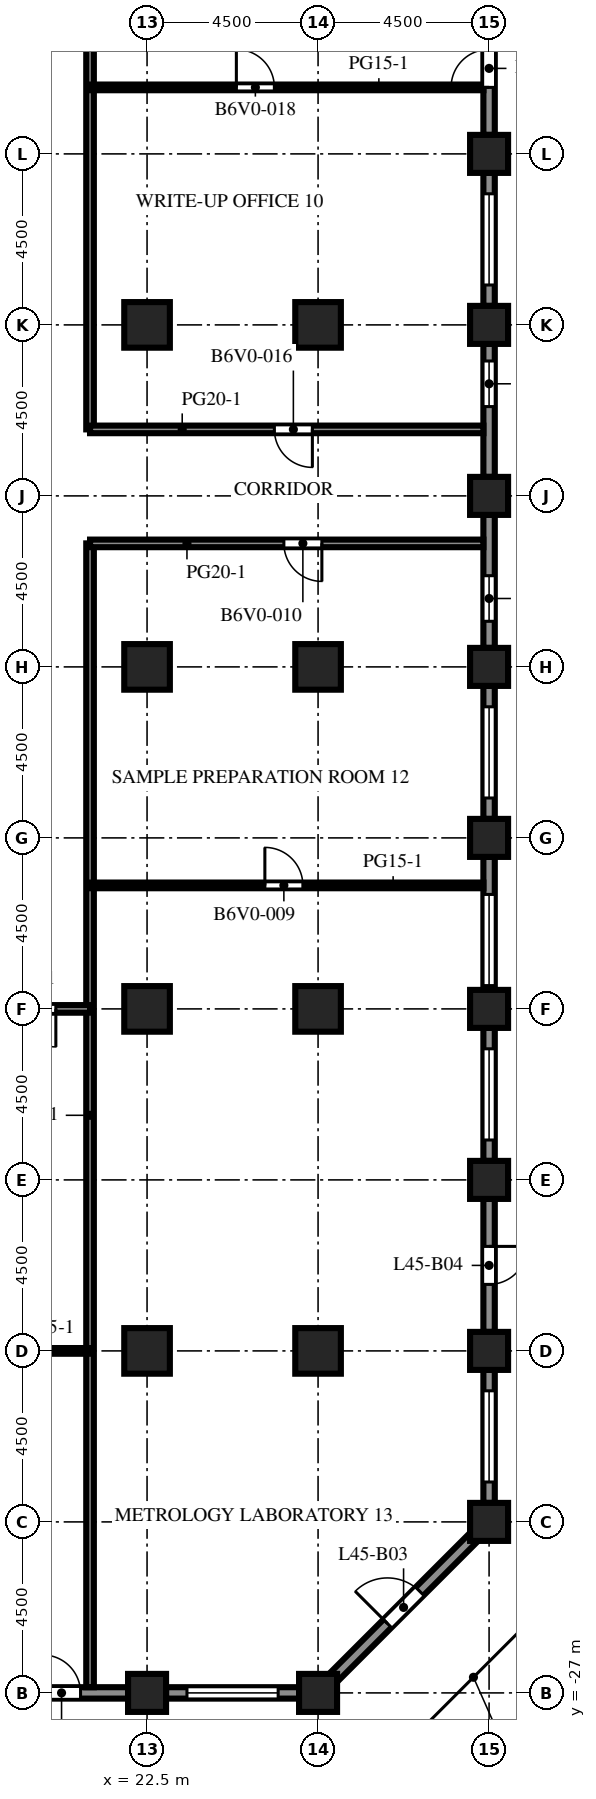
"""IFC4 building model, lengths in metres.
Left out: names, types, materials, properties, quantities, classifications, styles, units other than length and angle.
Written with IfcOpenShell. Run it as: python <this file> out.ifc"""

import sys

from ifc_helpers import new_model, si_unit, direction, frame, frame_2d, origin, origin_2d, place, context, subcontext, project, spatial, rectangle, extrude, element, fill, save


model = new_model("IFC4")
c1 = context("Model", 3, precision=1e-05, world=origin(), true_north=direction((0.0, 1.0)))
c2 = subcontext(c1, "Body", "Model", "MODEL_VIEW")
j1 = project(units=[si_unit("LENGTHUNIT", "METRE"), si_unit("PLANEANGLEUNIT", "RADIAN")], contexts=[c1])
p1 = place(None, origin())
s1 = spatial("IfcSite", under=j1, at=p1, CompositionType="ELEMENT")
p2 = place(p1, origin())
s2 = spatial("IfcBuilding", under=s1, at=p2, CompositionType="ELEMENT")
p3 = place(p2, frame((0.0, 0.0, 199.7)))
s3 = spatial("IfcBuildingStorey", under=s2, at=p3, CompositionType="ELEMENT", Elevation=199.7)
for number, where, z_axis, x_axis in (
    (1, (22.5, -27.0, 0.0), (0.0, 0.0, 1.0), (1.0, 0.0, 0.0)),
    (2, (27.0, -27.0, 0.0), (0.0, 0.0, 1.0), (1.0, 0.0, 0.0)),
    (3, (31.5, -22.5, 0.0), (0.0, 0.0, 1.0), (1.0, 0.0, 0.0)),
    (4, (31.5, -18.0, 0.0), (0.0, 0.0, 1.0), (1.0, 0.0, 0.0)),
    (5, (31.5, -13.5, 0.0), (0.0, 0.0, 1.0), (1.0, 0.0, 0.0)),
    (6, (31.5, -9.0, 0.0), (0.0, 0.0, 1.0), (1.0, 0.0, 0.0)),
    (7, (31.5, -4.5, 0.0), (0.0, 0.0, 1.0), (1.0, 0.0, 0.0)),
    (8, (31.5, 0.0, 0.0), (0.0, 0.0, 1.0), (1.0, 0.0, 0.0)),
    (9, (31.5, 4.5, 0.0), (0.0, 0.0, 1.0), (1.0, 0.0, 0.0)),
    (10, (31.5, 9.0, 0.0), (0.0, 0.0, 1.0), (1.0, 0.0, 0.0)),
    (11, (31.5, 13.5, 0.0), (0.0, 0.0, 1.0), (1.0, 0.0, 0.0)),
):
    element("IfcColumn", number, at=place(p3, frame(where, z_axis=z_axis, x_axis=x_axis)), inside=s3, PredefinedType="COLUMN", context=c2, shape_type="SweptSolid", body=[
        extrude(rectangle(XDim=1.0, YDim=1.0, at=origin_2d()), origin(), (0.0, 0.0, 1.0), 4.1),
    ])
for number, where, z_axis, x_axis in (
    (12, (22.5, -18.0, 0.0), (0.0, 0.0, 1.0), (1.0, 0.0, 0.0)),
    (13, (22.5, -9.0, 0.0), (0.0, 0.0, 1.0), (1.0, 0.0, 0.0)),
    (14, (22.5, 0.0, 0.0), (0.0, 0.0, 1.0), (1.0, 0.0, 0.0)),
    (15, (22.5, 9.0, 0.0), (0.0, 0.0, 1.0), (1.0, 0.0, 0.0)),
    (16, (27.0, -18.0, 0.0), (0.0, 0.0, 1.0), (1.0, 0.0, 0.0)),
    (17, (27.0, -9.0, 0.0), (0.0, 0.0, 1.0), (1.0, 0.0, 0.0)),
    (18, (27.0, 0.0, 0.0), (0.0, 0.0, 1.0), (1.0, 0.0, 0.0)),
    (19, (27.0, 9.0, 0.0), (0.0, 0.0, 1.0), (1.0, 0.0, 0.0)),
):
    element("IfcColumn", number, at=place(p3, frame(where, z_axis=z_axis, x_axis=x_axis)), inside=s3, PredefinedType="COLUMN", context=c2, shape_type="SweptSolid", body=[
        extrude(rectangle(XDim=1.2, YDim=1.2, at=origin_2d()), origin(), (0.0, 0.0, 1.0), 4.1),
    ])
p4 = place(p3, frame((22.0, -27.0, 0.0), z_axis=(0.0, 0.0, 1.0), x_axis=(-1.0, 0.0, 0.0)))
e20 = element("IfcWall", 20, at=p4, inside=s3, PredefinedType="SOLIDWALL", context=c2, shape_type="SweptSolid", body=[
    extrude(rectangle(XDim=3.5, YDim=0.3, at=frame_2d((1.75, 0.0))), origin(), (0.0, 0.0, 1.0), 2.85),
])
p5 = place(p4, frame((1.25, 0.0, 0.0)))
e21 = element("IfcOpeningElement", 21, at=p5, cuts=e20, PredefinedType="OPENING", context=c2, shape_type="SweptSolid", body=[
    extrude(rectangle(XDim=1.0, YDim=2.2, at=frame_2d((0.5, 1.1))), frame((0.0, 0.16, 0.0), z_axis=(0.0, -1.0, 0.0), x_axis=(1.0, 0.0, 0.0)), (0.0, 0.0, 1.0), 0.32),
])
p6 = place(p3, frame((26.5, -27.0, 0.0), z_axis=(0.0, 0.0, 1.0), x_axis=(-1.0, 0.0, 0.0)))
e22 = element("IfcWall", 22, at=p6, inside=s3, PredefinedType="SOLIDWALL", context=c2, shape_type="SweptSolid", body=[
    extrude(rectangle(XDim=3.5, YDim=0.3, at=frame_2d((1.75, 0.0))), origin(), (0.0, 0.0, 1.0), 2.85),
])
p7 = place(p6, frame((0.55, 0.0, 0.8)))
e23 = element("IfcOpeningElement", 23, at=p7, cuts=e22, PredefinedType="OPENING", context=c2, shape_type="SweptSolid", body=[
    extrude(rectangle(XDim=2.4, YDim=1.7, at=frame_2d((1.2, 0.85))), frame((0.0, 0.16, 0.0), z_axis=(0.0, -1.0, 0.0), x_axis=(1.0, 0.0, 0.0)), (0.0, 0.0, 1.0), 0.32),
])
p8 = place(p3, frame((31.106, -22.894, 0.0), z_axis=(0.0, 0.0, 1.0), x_axis=(-0.707106781187, -0.707106781187, 0.0)))
e24 = element("IfcWall", 24, at=p8, inside=s3, PredefinedType="SOLIDWALL", context=c2, shape_type="SweptSolid", body=[
    extrude(rectangle(XDim=5.25, YDim=0.3, at=frame_2d((2.625, 0.0))), origin(), (0.0, 0.0, 1.0), 2.85),
])
p9 = place(p8, frame((2.025, 0.0, 0.0)))
e25 = element("IfcOpeningElement", 25, at=p9, cuts=e24, PredefinedType="OPENING", context=c2, shape_type="SweptSolid", body=[
    extrude(rectangle(XDim=1.2, YDim=2.2, at=frame_2d((0.6, 1.1))), frame((0.0, 0.16, 0.0), z_axis=(0.0, -1.0, 0.0), x_axis=(1.0, 0.0, 0.0)), (0.0, 0.0, 1.0), 0.32),
])
p10 = place(p3, frame((31.5, -18.5, 0.0), z_axis=(0.0, 0.0, 1.0), x_axis=(0.0, -1.0, 0.0)))
e26 = element("IfcWall", 26, at=p10, inside=s3, PredefinedType="SOLIDWALL", context=c2, shape_type="SweptSolid", body=[
    extrude(rectangle(XDim=3.5, YDim=0.3, at=frame_2d((1.75, 0.0))), origin(), (0.0, 0.0, 1.0), 2.85),
])
p11 = place(p10, frame((0.55, 0.0, 0.8)))
e27 = element("IfcOpeningElement", 27, at=p11, cuts=e26, PredefinedType="OPENING", context=c2, shape_type="SweptSolid", body=[
    extrude(rectangle(XDim=2.4, YDim=1.7, at=frame_2d((1.2, 0.85))), frame((0.0, 0.16, 0.0), z_axis=(0.0, -1.0, 0.0), x_axis=(1.0, 0.0, 0.0)), (0.0, 0.0, 1.0), 0.32),
])
p12 = place(p3, frame((31.5, -14.0, 0.0), z_axis=(0.0, 0.0, 1.0), x_axis=(0.0, -1.0, 0.0)))
e28 = element("IfcWall", 28, at=p12, inside=s3, PredefinedType="SOLIDWALL", context=c2, shape_type="SweptSolid", body=[
    extrude(rectangle(XDim=3.5, YDim=0.3, at=frame_2d((1.75, 0.0))), origin(), (0.0, 0.0, 1.0), 2.85),
])
p13 = place(p12, frame((1.25, 0.0, 0.0)))
e29 = element("IfcOpeningElement", 29, at=p13, cuts=e28, PredefinedType="OPENING", context=c2, shape_type="SweptSolid", body=[
    extrude(rectangle(XDim=1.0, YDim=2.2, at=frame_2d((0.5, 1.1))), frame((0.0, 0.16, 0.0), z_axis=(0.0, -1.0, 0.0), x_axis=(1.0, 0.0, 0.0)), (0.0, 0.0, 1.0), 0.32),
])
p14 = place(p3, frame((31.5, -9.5, 0.0), z_axis=(0.0, 0.0, 1.0), x_axis=(0.0, -1.0, 0.0)))
e30 = element("IfcWall", 30, at=p14, inside=s3, PredefinedType="SOLIDWALL", context=c2, shape_type="SweptSolid", body=[
    extrude(rectangle(XDim=3.5, YDim=0.3, at=frame_2d((1.75, 0.0))), origin(), (0.0, 0.0, 1.0), 2.85),
])
p15 = place(p14, frame((0.55, 0.0, 0.8)))
e31 = element("IfcOpeningElement", 31, at=p15, cuts=e30, PredefinedType="OPENING", context=c2, shape_type="SweptSolid", body=[
    extrude(rectangle(XDim=2.4, YDim=1.7, at=frame_2d((1.2, 0.85))), frame((0.0, 0.16, 0.0), z_axis=(0.0, -1.0, 0.0), x_axis=(1.0, 0.0, 0.0)), (0.0, 0.0, 1.0), 0.32),
])
p16 = place(p3, frame((31.5, -5.0, 0.0), z_axis=(0.0, 0.0, 1.0), x_axis=(0.0, -1.0, 0.0)))
e32 = element("IfcWall", 32, at=p16, inside=s3, PredefinedType="SOLIDWALL", context=c2, shape_type="SweptSolid", body=[
    extrude(rectangle(XDim=3.5, YDim=0.3, at=frame_2d((1.75, 0.0))), origin(), (0.0, 0.0, 1.0), 2.85),
])
p17 = place(p16, frame((0.988, 0.0, 0.8)))
e33 = element("IfcOpeningElement", 33, at=p17, cuts=e32, PredefinedType="OPENING", context=c2, shape_type="SweptSolid", body=[
    extrude(rectangle(XDim=2.4, YDim=1.7, at=frame_2d((1.2, 0.85))), frame((0.0, 0.16, 0.0), z_axis=(0.0, -1.0, 0.0), x_axis=(1.0, 0.0, 0.0)), (0.0, 0.0, 1.0), 0.32),
])
p18 = place(p3, frame((31.5, -0.5, 0.0), z_axis=(0.0, 0.0, 1.0), x_axis=(0.0, -1.0, 0.0)))
e34 = element("IfcWall", 34, at=p18, inside=s3, PredefinedType="SOLIDWALL", context=c2, shape_type="SweptSolid", body=[
    extrude(rectangle(XDim=3.5, YDim=0.3, at=frame_2d((1.75, 0.0))), origin(), (0.0, 0.0, 1.0), 2.85),
])
p19 = place(p18, frame((0.55, 0.0, 0.8)))
e35 = element("IfcOpeningElement", 35, at=p19, cuts=e34, PredefinedType="OPENING", context=c2, shape_type="SweptSolid", body=[
    extrude(rectangle(XDim=2.4, YDim=1.7, at=frame_2d((1.2, 0.85))), frame((0.0, 0.16, 0.0), z_axis=(0.0, -1.0, 0.0), x_axis=(1.0, 0.0, 0.0)), (0.0, 0.0, 1.0), 0.32),
])
p20 = place(p3, frame((31.5, 4.0, 0.0), z_axis=(0.0, 0.0, 1.0), x_axis=(0.0, -1.0, 0.0)))
e36 = element("IfcWall", 36, at=p20, inside=s3, PredefinedType="SOLIDWALL", context=c2, shape_type="SweptSolid", body=[
    extrude(rectangle(XDim=3.5, YDim=0.3, at=frame_2d((1.75, 0.0))), origin(), (0.0, 0.0, 1.0), 2.85),
])
p21 = place(p20, frame((1.6, 0.0, 0.8)))
e37 = element("IfcOpeningElement", 37, at=p21, cuts=e36, PredefinedType="OPENING", context=c2, shape_type="SweptSolid", body=[
    extrude(rectangle(XDim=1.2, YDim=1.7, at=frame_2d((0.6, 0.85))), frame((0.0, 0.16, 0.0), z_axis=(0.0, -1.0, 0.0), x_axis=(1.0, 0.0, 0.0)), (0.0, 0.0, 1.0), 0.32),
])
p22 = place(p3, frame((31.5, 8.5, 0.0), z_axis=(0.0, 0.0, 1.0), x_axis=(0.0, -1.0, 0.0)))
e38 = element("IfcWall", 38, at=p22, inside=s3, PredefinedType="SOLIDWALL", context=c2, shape_type="SweptSolid", body=[
    extrude(rectangle(XDim=3.5, YDim=0.3, at=frame_2d((1.75, 0.0))), origin(), (0.0, 0.0, 1.0), 2.85),
])
p23 = place(p22, frame((0.45, 0.0, 0.8)))
e39 = element("IfcOpeningElement", 39, at=p23, cuts=e38, PredefinedType="OPENING", context=c2, shape_type="SweptSolid", body=[
    extrude(rectangle(XDim=1.2, YDim=1.7, at=frame_2d((0.6, 0.85))), frame((0.0, 0.16, 0.0), z_axis=(0.0, -1.0, 0.0), x_axis=(1.0, 0.0, 0.0)), (0.0, 0.0, 1.0), 0.32),
])
p24 = place(p3, frame((31.5, 13.0, 0.0), z_axis=(0.0, 0.0, 1.0), x_axis=(0.0, -1.0, 0.0)))
e40 = element("IfcWall", 40, at=p24, inside=s3, PredefinedType="SOLIDWALL", context=c2, shape_type="SweptSolid", body=[
    extrude(rectangle(XDim=3.5, YDim=0.3, at=frame_2d((1.75, 0.0))), origin(), (0.0, 0.0, 1.0), 2.85),
])
p25 = place(p24, frame((0.55, 0.0, 0.8)))
e41 = element("IfcOpeningElement", 41, at=p25, cuts=e40, PredefinedType="OPENING", context=c2, shape_type="SweptSolid", body=[
    extrude(rectangle(XDim=2.4, YDim=1.7, at=frame_2d((1.2, 0.85))), frame((0.0, 0.16, 0.0), z_axis=(0.0, -1.0, 0.0), x_axis=(1.0, 0.0, 0.0)), (0.0, 0.0, 1.0), 0.32),
])
p26 = place(p3, frame((31.5, 17.5, 0.0), z_axis=(0.0, 0.0, 1.0), x_axis=(0.0, -1.0, 0.0)))
e42 = element("IfcWall", 42, at=p26, inside=s3, PredefinedType="SOLIDWALL", context=c2, shape_type="SweptSolid", body=[
    extrude(rectangle(XDim=3.5, YDim=0.3, at=frame_2d((1.75, 0.0))), origin(), (0.0, 0.0, 1.0), 2.85),
])
p27 = place(p26, frame((1.25, 0.0, 0.0)))
e43 = element("IfcOpeningElement", 43, at=p27, cuts=e42, PredefinedType="OPENING", context=c2, shape_type="SweptSolid", body=[
    extrude(rectangle(XDim=1.0, YDim=2.2, at=frame_2d((0.5, 1.1))), frame((0.0, 0.16, 0.0), z_axis=(0.0, -1.0, 0.0), x_axis=(1.0, 0.0, 0.0)), (0.0, 0.0, 1.0), 0.32),
])
p28 = place(p3, frame((21.0, -26.85, 0.0), z_axis=(0.0, 0.0, 1.0), x_axis=(0.0, 1.0, 0.0)))
e44 = element("IfcWall", 44, at=p28, inside=s3, PredefinedType="PARTITIONING", context=c2, shape_type="SweptSolid", body=[
    extrude(rectangle(XDim=30.1, YDim=0.2, at=frame_2d((15.05, 0.0))), origin(), (0.0, 0.0, 1.0), 3.65),
])
p29 = place(p3, frame((21.0, 6.25, 0.0), z_axis=(0.0, 0.0, 1.0), x_axis=(0.0, 1.0, 0.0)))
e45 = element("IfcWall", 45, at=p29, inside=s3, PredefinedType="PARTITIONING", context=c2, shape_type="SweptSolid", body=[
    extrude(rectangle(XDim=20.6, YDim=0.2, at=frame_2d((10.3, 0.0))), origin(), (0.0, 0.0, 1.0), 3.65),
])
p30 = place(p3, frame((18.6, -18.0, 0.0), z_axis=(0.0, 0.0, 1.0), x_axis=(1.0, 0.0, 0.0)))
e46 = element("IfcWall", 46, at=p30, inside=s3, PredefinedType="PARTITIONING", context=c2, shape_type="SweptSolid", body=[
    extrude(rectangle(XDim=2.4, YDim=0.15, at=frame_2d((1.2, 0.0))), origin(), (0.0, 0.0, 1.0), 3.65),
])
p31 = place(p3, frame((21.0, -9.0, 0.0), z_axis=(0.0, 0.0, 1.0), x_axis=(-1.0, 0.0, 0.0)))
e47 = element("IfcWall", 47, at=p31, inside=s3, PredefinedType="PARTITIONING", context=c2, shape_type="SweptSolid", body=[
    extrude(rectangle(XDim=3.0, YDim=0.2, at=frame_2d((1.5, 0.0))), origin(), (0.0, 0.0, 1.0), 3.65),
])
p32 = place(p31, frame((0.9, 0.0, 0.0)))
e48 = element("IfcOpeningElement", 48, at=p32, cuts=e47, PredefinedType="OPENING", context=c2, shape_type="SweptSolid", body=[
    extrude(rectangle(XDim=1.0, YDim=2.1, at=frame_2d((0.5, 1.05))), frame((0.0, 0.11, 0.0), z_axis=(0.0, -1.0, 0.0), x_axis=(1.0, 0.0, 0.0)), (0.0, 0.0, 1.0), 0.22),
])
p33 = place(p3, frame((31.35, -5.75, 0.0), z_axis=(0.0, 0.0, 1.0), x_axis=(-1.0, 0.0, 0.0)))
e49 = element("IfcWall", 49, at=p33, inside=s3, PredefinedType="PARTITIONING", context=c2, shape_type="SweptSolid", body=[
    extrude(rectangle(XDim=10.35, YDim=0.15, at=frame_2d((5.175, 0.0))), origin(), (0.0, 0.0, 1.0), 3.65),
])
p34 = place(p33, frame((4.75, 0.0, 0.0)))
e50 = element("IfcOpeningElement", 50, at=p34, cuts=e49, PredefinedType="OPENING", context=c2, shape_type="SweptSolid", body=[
    extrude(rectangle(XDim=1.0, YDim=2.1, at=frame_2d((0.5, 1.05))), frame((0.0, 0.085, 0.0), z_axis=(0.0, -1.0, 0.0), x_axis=(1.0, 0.0, 0.0)), (0.0, 0.0, 1.0), 0.17),
])
p35 = place(p3, frame((31.35, 3.25, 0.0), z_axis=(0.0, 0.0, 1.0), x_axis=(-1.0, 0.0, 0.0)))
e51 = element("IfcWall", 51, at=p35, inside=s3, PredefinedType="PARTITIONING", context=c2, shape_type="SweptSolid", body=[
    extrude(rectangle(XDim=10.35, YDim=0.2, at=frame_2d((5.175, 0.0))), origin(), (0.0, 0.0, 1.0), 3.65),
])
p36 = place(p35, frame((4.25, 0.0, 0.0)))
e52 = element("IfcOpeningElement", 52, at=p36, cuts=e51, PredefinedType="OPENING", context=c2, shape_type="SweptSolid", body=[
    extrude(rectangle(XDim=1.0, YDim=2.1, at=frame_2d((0.5, 1.05))), frame((0.0, 0.11, 0.0), z_axis=(0.0, -1.0, 0.0), x_axis=(1.0, 0.0, 0.0)), (0.0, 0.0, 1.0), 0.22),
])
p37 = place(p3, frame((21.0, 6.25, 0.0), z_axis=(0.0, 0.0, 1.0), x_axis=(1.0, 0.0, 0.0)))
e53 = element("IfcWall", 53, at=p37, inside=s3, PredefinedType="PARTITIONING", context=c2, shape_type="SweptSolid", body=[
    extrude(rectangle(XDim=10.35, YDim=0.2, at=frame_2d((5.175, 0.0))), origin(), (0.0, 0.0, 1.0), 3.65),
])
p38 = place(p37, frame((4.85, 0.0, 0.0)))
e54 = element("IfcOpeningElement", 54, at=p38, cuts=e53, PredefinedType="OPENING", context=c2, shape_type="SweptSolid", body=[
    extrude(rectangle(XDim=1.0, YDim=2.1, at=frame_2d((0.5, 1.05))), frame((0.0, 0.11, 0.0), z_axis=(0.0, -1.0, 0.0), x_axis=(1.0, 0.0, 0.0)), (0.0, 0.0, 1.0), 0.22),
])
p39 = place(p3, frame((21.0, 15.25, 0.0), z_axis=(0.0, 0.0, 1.0), x_axis=(1.0, 0.0, 0.0)))
e55 = element("IfcWall", 55, at=p39, inside=s3, PredefinedType="PARTITIONING", context=c2, shape_type="SweptSolid", body=[
    extrude(rectangle(XDim=10.35, YDim=0.15, at=frame_2d((5.175, 0.0))), origin(), (0.0, 0.0, 1.0), 3.65),
])
p40 = place(p39, frame((3.85, 0.0, 0.0)))
e56 = element("IfcOpeningElement", 56, at=p40, cuts=e55, PredefinedType="OPENING", context=c2, shape_type="SweptSolid", body=[
    extrude(rectangle(XDim=1.0, YDim=2.1, at=frame_2d((0.5, 1.05))), frame((0.0, 0.085, 0.0), z_axis=(0.0, -1.0, 0.0), x_axis=(1.0, 0.0, 0.0)), (0.0, 0.0, 1.0), 0.17),
])
p41 = place(p5, origin())
e57 = element("IfcDoor", 57, at=p41, inside=s3, OperationType="SINGLE_SWING_RIGHT", PredefinedType="DOOR", context=c2, shape_type="SweptSolid", body=[
    extrude(rectangle(XDim=1.0, YDim=2.2, at=frame_2d((0.5, 1.1))), frame((0.0, 0.025, 0.0), z_axis=(0.0, -1.0, 0.0), x_axis=(1.0, 0.0, 0.0)), (0.0, 0.0, 1.0), 0.05),
])
fill(e21, e57)
p42 = place(p7, origin())
e58 = element("IfcWindow", 58, at=p42, inside=s3, PartitioningType="SINGLE_PANEL", PredefinedType="WINDOW", context=c2, shape_type="SweptSolid", body=[
    extrude(rectangle(XDim=2.4, YDim=1.7, at=frame_2d((1.2, 0.85))), frame((0.0, 0.03, 0.0), z_axis=(0.0, -1.0, 0.0), x_axis=(1.0, 0.0, 0.0)), (0.0, 0.0, 1.0), 0.06),
])
fill(e23, e58)
p43 = place(p9, origin())
e59 = element("IfcDoor", 59, at=p43, inside=s3, OperationType="SINGLE_SWING_RIGHT", PredefinedType="DOOR", context=c2, shape_type="SweptSolid", body=[
    extrude(rectangle(XDim=1.2, YDim=2.2, at=frame_2d((0.6, 1.1))), frame((0.0, 0.025, 0.0), z_axis=(0.0, -1.0, 0.0), x_axis=(1.0, 0.0, 0.0)), (0.0, 0.0, 1.0), 0.05),
])
fill(e25, e59)
p44 = place(p11, origin())
e60 = element("IfcWindow", 60, at=p44, inside=s3, PartitioningType="SINGLE_PANEL", PredefinedType="WINDOW", context=c2, shape_type="SweptSolid", body=[
    extrude(rectangle(XDim=2.4, YDim=1.7, at=frame_2d((1.2, 0.85))), frame((0.0, 0.03, 0.0), z_axis=(0.0, -1.0, 0.0), x_axis=(1.0, 0.0, 0.0)), (0.0, 0.0, 1.0), 0.06),
])
fill(e27, e60)
p45 = place(p13, origin())
e61 = element("IfcDoor", 61, at=p45, inside=s3, OperationType="SINGLE_SWING_LEFT", PredefinedType="DOOR", context=c2, shape_type="SweptSolid", body=[
    extrude(rectangle(XDim=1.0, YDim=2.2, at=frame_2d((0.5, 1.1))), frame((0.0, 0.025, 0.0), z_axis=(0.0, -1.0, 0.0), x_axis=(1.0, 0.0, 0.0)), (0.0, 0.0, 1.0), 0.05),
])
fill(e29, e61)
p46 = place(p15, origin())
e62 = element("IfcWindow", 62, at=p46, inside=s3, PartitioningType="SINGLE_PANEL", PredefinedType="WINDOW", context=c2, shape_type="SweptSolid", body=[
    extrude(rectangle(XDim=2.4, YDim=1.7, at=frame_2d((1.2, 0.85))), frame((0.0, 0.03, 0.0), z_axis=(0.0, -1.0, 0.0), x_axis=(1.0, 0.0, 0.0)), (0.0, 0.0, 1.0), 0.06),
])
fill(e31, e62)
p47 = place(p17, origin())
e63 = element("IfcWindow", 63, at=p47, inside=s3, PartitioningType="SINGLE_PANEL", PredefinedType="WINDOW", context=c2, shape_type="SweptSolid", body=[
    extrude(rectangle(XDim=2.4, YDim=1.7, at=frame_2d((1.2, 0.85))), frame((0.0, 0.03, 0.0), z_axis=(0.0, -1.0, 0.0), x_axis=(1.0, 0.0, 0.0)), (0.0, 0.0, 1.0), 0.06),
])
fill(e33, e63)
p48 = place(p19, origin())
e64 = element("IfcWindow", 64, at=p48, inside=s3, PartitioningType="SINGLE_PANEL", PredefinedType="WINDOW", context=c2, shape_type="SweptSolid", body=[
    extrude(rectangle(XDim=2.4, YDim=1.7, at=frame_2d((1.2, 0.85))), frame((0.0, 0.03, 0.0), z_axis=(0.0, -1.0, 0.0), x_axis=(1.0, 0.0, 0.0)), (0.0, 0.0, 1.0), 0.06),
])
fill(e35, e64)
p49 = place(p21, origin())
e65 = element("IfcWindow", 65, at=p49, inside=s3, PartitioningType="SINGLE_PANEL", PredefinedType="WINDOW", context=c2, shape_type="SweptSolid", body=[
    extrude(rectangle(XDim=1.2, YDim=1.7, at=frame_2d((0.6, 0.85))), frame((0.0, 0.03, 0.0), z_axis=(0.0, -1.0, 0.0), x_axis=(1.0, 0.0, 0.0)), (0.0, 0.0, 1.0), 0.06),
])
fill(e37, e65)
p50 = place(p23, origin())
e66 = element("IfcWindow", 66, at=p50, inside=s3, PartitioningType="SINGLE_PANEL", PredefinedType="WINDOW", context=c2, shape_type="SweptSolid", body=[
    extrude(rectangle(XDim=1.2, YDim=1.7, at=frame_2d((0.6, 0.85))), frame((0.0, 0.03, 0.0), z_axis=(0.0, -1.0, 0.0), x_axis=(1.0, 0.0, 0.0)), (0.0, 0.0, 1.0), 0.06),
])
fill(e39, e66)
p51 = place(p25, origin())
e67 = element("IfcWindow", 67, at=p51, inside=s3, PartitioningType="SINGLE_PANEL", PredefinedType="WINDOW", context=c2, shape_type="SweptSolid", body=[
    extrude(rectangle(XDim=2.4, YDim=1.7, at=frame_2d((1.2, 0.85))), frame((0.0, 0.03, 0.0), z_axis=(0.0, -1.0, 0.0), x_axis=(1.0, 0.0, 0.0)), (0.0, 0.0, 1.0), 0.06),
])
fill(e41, e67)
p52 = place(p27, origin())
e68 = element("IfcDoor", 68, at=p52, inside=s3, OperationType="SINGLE_SWING_RIGHT", PredefinedType="DOOR", context=c2, shape_type="SweptSolid", body=[
    extrude(rectangle(XDim=1.0, YDim=2.2, at=frame_2d((0.5, 1.1))), frame((0.0, 0.025, 0.0), z_axis=(0.0, -1.0, 0.0), x_axis=(1.0, 0.0, 0.0)), (0.0, 0.0, 1.0), 0.05),
])
fill(e43, e68)
p53 = place(p32, origin())
e69 = element("IfcDoor", 69, at=p53, inside=s3, OperationType="SINGLE_SWING_LEFT", PredefinedType="DOOR", context=c2, shape_type="SweptSolid", body=[
    extrude(rectangle(XDim=1.0, YDim=2.1, at=frame_2d((0.5, 1.05))), frame((0.0, 0.025, 0.0), z_axis=(0.0, -1.0, 0.0), x_axis=(1.0, 0.0, 0.0)), (0.0, 0.0, 1.0), 0.05),
])
fill(e48, e69)
p54 = place(p34, origin())
e70 = element("IfcDoor", 70, at=p54, inside=s3, OperationType="SINGLE_SWING_RIGHT", PredefinedType="DOOR", context=c2, shape_type="SweptSolid", body=[
    extrude(rectangle(XDim=1.0, YDim=2.1, at=frame_2d((0.5, 1.05))), frame((0.0, 0.025, 0.0), z_axis=(0.0, -1.0, 0.0), x_axis=(1.0, 0.0, 0.0)), (0.0, 0.0, 1.0), 0.05),
])
fill(e50, e70)
p55 = place(p36, origin())
e71 = element("IfcDoor", 71, at=p55, inside=s3, OperationType="SINGLE_SWING_LEFT", PredefinedType="DOOR", context=c2, shape_type="SweptSolid", body=[
    extrude(rectangle(XDim=1.0, YDim=2.1, at=frame_2d((0.5, 1.05))), frame((0.0, 0.025, 0.0), z_axis=(0.0, -1.0, 0.0), x_axis=(1.0, 0.0, 0.0)), (0.0, 0.0, 1.0), 0.05),
])
fill(e52, e71)
p56 = place(p38, origin())
e72 = element("IfcDoor", 72, at=p56, inside=s3, OperationType="SINGLE_SWING_RIGHT", PredefinedType="DOOR", context=c2, shape_type="SweptSolid", body=[
    extrude(rectangle(XDim=1.0, YDim=2.1, at=frame_2d((0.5, 1.05))), frame((0.0, 0.025, 0.0), z_axis=(0.0, -1.0, 0.0), x_axis=(1.0, 0.0, 0.0)), (0.0, 0.0, 1.0), 0.05),
])
fill(e54, e72)
p57 = place(p40, origin())
e73 = element("IfcDoor", 73, at=p57, inside=s3, OperationType="SINGLE_SWING_LEFT", PredefinedType="DOOR", context=c2, shape_type="SweptSolid", body=[
    extrude(rectangle(XDim=1.0, YDim=2.1, at=frame_2d((0.5, 1.05))), frame((0.0, 0.025, 0.0), z_axis=(0.0, -1.0, 0.0), x_axis=(1.0, 0.0, 0.0)), (0.0, 0.0, 1.0), 0.05),
])
fill(e56, e73)
save(model, sys.argv[1])
